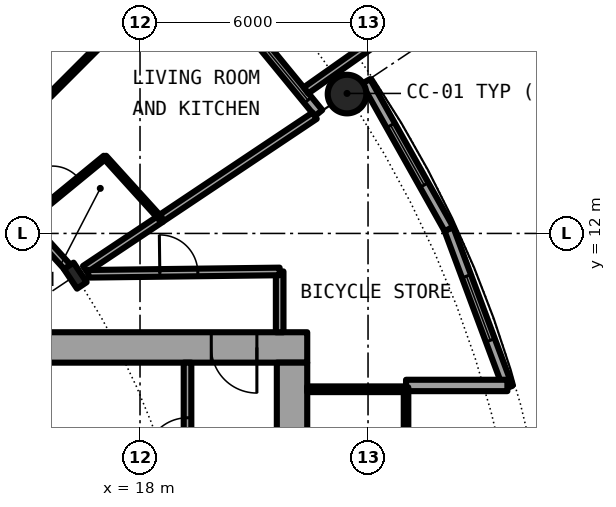
"""IFC4 building model, lengths in metres.
Left out: names, types, materials, properties, quantities, classifications, styles, units other than length and angle.
Written with IfcOpenShell. Run it as: python <this file> out.ifc"""

import sys

from ifc_helpers import new_model, si_unit, direction, frame, frame_2d, origin, origin_2d, place, context, subcontext, project, spatial, rectangle, hollow_circle, i_section, extrude, element, fill, save


model = new_model("IFC4")
c1 = context("Model", 3, precision=1e-05, world=origin(), true_north=direction((0.0, 1.0)))
c2 = subcontext(c1, "Body", "Model", "MODEL_VIEW")
j1 = project(units=[si_unit("LENGTHUNIT", "METRE"), si_unit("PLANEANGLEUNIT", "RADIAN")], contexts=[c1])
p1 = place(None, origin())
s1 = spatial("IfcSite", under=j1, at=p1, CompositionType="ELEMENT")
p2 = place(p1, origin())
s2 = spatial("IfcBuilding", under=s1, at=p2, CompositionType="ELEMENT")
p3 = place(p2, frame((0.0, 0.0, 22.8)))
s3 = spatial("IfcBuildingStorey", under=s2, at=p3, CompositionType="ELEMENT", Elevation=22.8)
p4 = place(p3, frame((23.448, 15.667, 0.0), z_axis=(0.0, 0.0, 1.0), x_axis=(1.0, 0.0, 0.0)))
e1 = element("IfcColumn", 1, at=p4, inside=s3, PredefinedType="COLUMN", context=c2, shape_type="SweptSolid", body=[
    extrude(hollow_circle(Radius=0.508, WallThickness=0.05, at=origin_2d()), origin(), (0.0, 0.0, 1.0), 3.05),
])
p5 = place(p3, frame((16.297, 10.889, 0.0), z_axis=(0.0, 0.0, 1.0), x_axis=(0.831469612303, 0.55557023302, 0.0)))
e2 = element("IfcColumn", 2, at=p5, inside=s3, PredefinedType="COLUMN", context=c2, shape_type="SweptSolid", body=[
    extrude(i_section(OverallWidth=0.305, OverallDepth=0.62, WebThickness=0.021, FlangeThickness=0.04, FilletRadius=0.027, at=origin_2d()), origin(), (0.0, 0.0, 1.0), 3.05),
])
p6 = place(p3, frame((22.699, 15.167, 0.0), z_axis=(0.0, 0.0, 1.0), x_axis=(-0.634382322723, 0.773019449054, 0.0)))
e3 = element("IfcWall", 3, at=p6, inside=s3, PredefinedType="SOLIDWALL", context=c2, shape_type="SweptSolid", body=[
    extrude(rectangle(XDim=5.352, YDim=0.25, at=frame_2d((2.676, 0.0))), origin(), (0.0, 0.0, 1.0), 2.7),
])
p7 = place(p6, frame((0.441, 0.0, 0.3)))
e4 = element("IfcOpeningElement", 4, at=p7, cuts=e3, PredefinedType="OPENING", context=c2, shape_type="SweptSolid", body=[
    extrude(rectangle(XDim=1.8, YDim=2.1, at=frame_2d((0.9, 1.05))), frame((0.0, 0.135, 0.0), z_axis=(0.0, -1.0, 0.0), x_axis=(1.0, 0.0, 0.0)), (0.0, 0.0, 1.0), 0.27),
])
p8 = place(p6, frame((3.51, 0.0, 0.0)))
e5 = element("IfcOpeningElement", 5, at=p8, cuts=e3, PredefinedType="OPENING", context=c2, shape_type="SweptSolid", body=[
    extrude(rectangle(XDim=1.0, YDim=2.2, at=frame_2d((0.5, 1.1))), frame((0.0, 0.135, 0.0), z_axis=(0.0, -1.0, 0.0), x_axis=(1.0, 0.0, 0.0)), (0.0, 0.0, 1.0), 0.27),
])
p9 = place(p3, frame((22.37, 15.765, -0.03), z_axis=(0.0, 0.0, 1.0), x_axis=(0.817256123454, 0.576274612209, 0.0)))
e6 = element("IfcWall", 6, at=p9, inside=s3, PredefinedType="SOLIDWALL", context=c2, shape_type="SweptSolid", body=[
    extrude(rectangle(XDim=2.933, YDim=0.2, at=frame_2d((1.466, 0.0))), origin(), (0.0, 0.0, 1.0), 2.73),
])
p10 = place(p3, frame((27.682, 7.945, 0.0), z_axis=(0.0, 0.0, 1.0), x_axis=(-0.349247811493, 0.937030397675, 0.0)))
e7 = element("IfcWall", 7, at=p10, inside=s3, PredefinedType="SOLIDWALL", context=c2, shape_type="SweptSolid", body=[
    extrude(rectangle(XDim=4.452, YDim=0.25, at=frame_2d((2.226, 0.0))), origin(), (0.0, 0.0, 1.0), 2.7),
])
p11 = place(p10, frame((1.327, 0.0, 0.3)))
e8 = element("IfcOpeningElement", 8, at=p11, cuts=e7, PredefinedType="OPENING", context=c2, shape_type="SweptSolid", body=[
    extrude(rectangle(XDim=1.8, YDim=2.1, at=frame_2d((0.9, 1.05))), frame((0.0, 0.135, 0.0), z_axis=(0.0, -1.0, 0.0), x_axis=(1.0, 0.0, 0.0)), (0.0, 0.0, 1.0), 0.27),
])
p12 = place(p3, frame((26.127, 12.117, 0.0), z_axis=(0.0, 0.0, 1.0), x_axis=(-0.489696356642, 0.871893042919, 0.0)))
e9 = element("IfcWall", 9, at=p12, inside=s3, PredefinedType="SOLIDWALL", context=c2, shape_type="SweptSolid", body=[
    extrude(rectangle(XDim=4.454, YDim=0.25, at=frame_2d((2.227, 0.0))), origin(), (0.0, 0.0, 1.0), 2.7),
])
p13 = place(p12, frame((1.327, 0.0, 0.3)))
e10 = element("IfcOpeningElement", 10, at=p13, cuts=e9, PredefinedType="OPENING", context=c2, shape_type="SweptSolid", body=[
    extrude(rectangle(XDim=1.8, YDim=2.1, at=frame_2d((0.9, 1.05))), frame((0.0, 0.135, 0.0), z_axis=(0.0, -1.0, 0.0), x_axis=(1.0, 0.0, 0.0)), (0.0, 0.0, 1.0), 0.27),
])
p14 = place(p3, frame((25.0, 8.0, 0.0), z_axis=(0.0, 0.0, 1.0), x_axis=(1.0, 0.0, 0.0)))
e11 = element("IfcWall", 11, at=p14, inside=s3, PredefinedType="SOLIDWALL", context=c2, shape_type="SweptSolid", body=[
    extrude(rectangle(XDim=2.667, YDim=0.3, at=frame_2d((1.333, 0.0))), origin(), (0.0, 0.0, 1.0), 2.7),
])
p15 = place(p3, frame((22.4, 9.0, 0.0), z_axis=(0.0, 0.0, 1.0), x_axis=(-1.0, 0.0, 0.0)))
e12 = element("IfcWall", 12, at=p15, inside=s3, PredefinedType="SHEAR", context=c2, shape_type="SweptSolid", body=[
    extrude(rectangle(XDim=14.2, YDim=0.8, at=frame_2d((7.1, 0.0))), origin(), (0.0, 0.0, 1.0), 3.05),
])
p16 = place(p15, frame((1.325, 0.0, 0.0)))
e13 = element("IfcOpeningElement", 13, at=p16, cuts=e12, PredefinedType="OPENING", context=c2, shape_type="SweptSolid", body=[
    extrude(rectangle(XDim=1.2, YDim=2.3, at=frame_2d((0.6, 1.15))), frame((0.0, 0.41, 0.0), z_axis=(0.0, -1.0, 0.0), x_axis=(1.0, 0.0, 0.0)), (0.0, 0.0, 1.0), 0.82),
])
p17 = place(p3, frame((22.0, 8.6, 0.0), z_axis=(0.0, 0.0, 1.0), x_axis=(0.0, -1.0, 0.0)))
e14 = element("IfcWall", 14, at=p17, inside=s3, PredefinedType="SHEAR", context=c2, shape_type="SweptSolid", body=[
    extrude(rectangle(XDim=17.2, YDim=0.8, at=frame_2d((8.6, 0.0))), origin(), (0.0, 0.0, 1.0), 3.05),
])
p18 = place(p17, frame((7.7, 0.0, 0.0)))
e15 = element("IfcOpeningElement", 15, at=p18, cuts=e14, PredefinedType="OPENING", context=c2, shape_type="SweptSolid", body=[
    extrude(rectangle(XDim=1.8, YDim=2.3, at=frame_2d((0.9, 1.15))), frame((0.0, 0.41, 0.0), z_axis=(0.0, -1.0, 0.0), x_axis=(1.0, 0.0, 0.0)), (0.0, 0.0, 1.0), 0.82),
])
p19 = place(p3, frame((19.25, 1.575, 0.0), z_axis=(0.0, 0.0, 1.0), x_axis=(0.0, 1.0, 0.0)))
e16 = element("IfcWall", 16, at=p19, inside=s3, PredefinedType="SOLIDWALL", context=c2, shape_type="SweptSolid", body=[
    extrude(rectangle(XDim=7.025, YDim=0.2, at=frame_2d((3.513, 0.0))), origin(), (0.0, 0.0, 1.0), 2.7),
])
p20 = place(p19, frame((4.475, 0.0, 0.0)))
e17 = element("IfcOpeningElement", 17, at=p20, cuts=e16, PredefinedType="OPENING", context=c2, shape_type="SweptSolid", body=[
    extrude(rectangle(XDim=1.1, YDim=2.3, at=frame_2d((0.55, 1.15))), frame((0.0, 0.11, 0.0), z_axis=(0.0, -1.0, 0.0), x_axis=(1.0, 0.0, 0.0)), (0.0, 0.0, 1.0), 0.22),
])
p21 = place(p3, frame((22.4, 7.9, 0.0), z_axis=(0.0, 0.0, 1.0), x_axis=(1.0, 0.0, 0.0)))
e18 = element("IfcWall", 18, at=p21, inside=s3, PredefinedType="PARTITIONING", context=c2, shape_type="SweptSolid", body=[
    extrude(rectangle(XDim=2.54, YDim=0.15, at=frame_2d((1.27, 0.0))), origin(), (0.0, 0.0, 1.0), 2.7),
])
p22 = place(p3, frame((25.0, -7.95, 0.0), z_axis=(0.0, 0.0, 1.0), x_axis=(0.0, 1.0, 0.0)))
e19 = element("IfcWall", 19, at=p22, inside=s3, PredefinedType="PARTITIONING", context=c2, shape_type="SweptSolid", body=[
    extrude(rectangle(XDim=15.9, YDim=0.12, at=frame_2d((7.95, 0.0))), origin(), (0.0, 0.0, 1.0), 2.7),
])
p23 = place(p22, frame((0.95, 0.0, 0.1)))
e20 = element("IfcOpeningElement", 20, at=p23, cuts=e19, PredefinedType="OPENING", context=c2, shape_type="SweptSolid", body=[
    extrude(rectangle(XDim=14.0, YDim=2.35, at=frame_2d((7.0, 1.175))), frame((0.0, 0.07, 0.0), z_axis=(0.0, -1.0, 0.0), x_axis=(1.0, 0.0, 0.0)), (0.0, 0.0, 1.0), 0.14),
])
p24 = place(p3, frame((21.675, 9.4, 0.0), z_axis=(0.0, 0.0, 1.0), x_axis=(0.0, 1.0, 0.0)))
e21 = element("IfcWall", 21, at=p24, inside=s3, PredefinedType="PARTITIONING", context=c2, shape_type="SweptSolid", body=[
    extrude(rectangle(XDim=1.6, YDim=0.2, at=frame_2d((0.8, 0.0))), origin(), (0.0, 0.0, 1.0), 2.7),
])
p25 = place(p3, frame((12.432, 15.152, 0.0), z_axis=(0.0, 0.0, 1.0), x_axis=(0.634353152115, 0.77304338714, 0.0)))
e22 = element("IfcWall", 22, at=p25, inside=s3, PredefinedType="PARTITIONING", context=c2, shape_type="SweptSolid", body=[
    extrude(rectangle(XDim=7.576, YDim=0.2, at=frame_2d((3.788, 0.0))), origin(), (0.0, 0.0, 1.0), 2.7),
])
p26 = place(p3, frame((15.009, 12.31, 0.0), z_axis=(0.0, 0.0, 1.0), x_axis=(0.77319617123, 0.634166918717, 0.0)))
e23 = element("IfcWall", 23, at=p26, inside=s3, PredefinedType="PARTITIONING", context=c2, shape_type="SweptSolid", body=[
    extrude(rectangle(XDim=2.675, YDim=0.1, at=frame_2d((1.337, 0.0))), origin(), (0.0, 0.0, 1.0), 2.7),
])
p27 = place(p26, frame((0.887, 0.0, 0.0)))
e24 = element("IfcOpeningElement", 24, at=p27, cuts=e23, PredefinedType="OPENING", context=c2, shape_type="SweptSolid", body=[
    extrude(rectangle(XDim=0.9, YDim=2.3, at=frame_2d((0.45, 1.15))), frame((0.0, 0.06, 0.0), z_axis=(0.0, -1.0, 0.0), x_axis=(1.0, 0.0, 0.0)), (0.0, 0.0, 1.0), 0.12),
])
p28 = place(p3, frame((15.612, 15.622, 0.0), z_axis=(0.0, 0.0, 1.0), x_axis=(0.706914880313, 0.707298629994, 0.0)))
e25 = element("IfcWall", 25, at=p28, inside=s3, PredefinedType="PARTITIONING", context=c2, shape_type="SweptSolid", body=[
    extrude(rectangle(XDim=5.09, YDim=0.1, at=frame_2d((2.545, 0.0))), origin(), (0.0, 0.0, 1.0), 2.7),
])
p29 = place(p28, frame((2.095, 0.0, 0.0)))
e26 = element("IfcOpeningElement", 26, at=p29, cuts=e25, PredefinedType="OPENING", context=c2, shape_type="SweptSolid", body=[
    extrude(rectangle(XDim=0.9, YDim=2.3, at=frame_2d((0.45, 1.15))), frame((0.0, 0.06, 0.0), z_axis=(0.0, -1.0, 0.0), x_axis=(1.0, 0.0, 0.0)), (0.0, 0.0, 1.0), 0.12),
])
p30 = place(p3, frame((18.542, 12.389, 0.0), z_axis=(0.0, 0.0, 1.0), x_axis=(0.831387096605, 0.55569370664, 0.0)))
e27 = element("IfcWall", 27, at=p30, inside=s3, PredefinedType="PARTITIONING", context=c2, shape_type="SweptSolid", body=[
    extrude(rectangle(XDim=4.875, YDim=0.2, at=frame_2d((2.438, 0.0))), origin(), (0.0, 0.0, 1.0), 2.7),
])
p31 = place(p3, frame((16.555, 11.061, 0.0), z_axis=(0.0, 0.0, 1.0), x_axis=(0.832066006555, 0.554676627176, 0.0)))
e28 = element("IfcWall", 28, at=p31, inside=s3, PredefinedType="PARTITIONING", context=c2, shape_type="SweptSolid", body=[
    extrude(rectangle(XDim=2.39, YDim=0.2, at=frame_2d((1.195, 0.0))), origin(), (0.0, 0.0, 1.0), 2.7),
])
p32 = place(p3, frame((16.637, 10.938, 0.0), z_axis=(0.0, 0.0, 1.0), x_axis=(0.99992425795, 0.012307654658, 0.0)))
e29 = element("IfcWall", 29, at=p32, inside=s3, PredefinedType="PARTITIONING", context=c2, shape_type="SweptSolid", body=[
    extrude(rectangle(XDim=5.039, YDim=0.2, at=frame_2d((2.519, 0.0))), origin(), (0.0, 0.0, 1.0), 2.7),
])
p33 = place(p32, frame((1.884, 0.0, 0.0)))
e30 = element("IfcOpeningElement", 30, at=p33, cuts=e29, PredefinedType="OPENING", context=c2, shape_type="SweptSolid", body=[
    extrude(rectangle(XDim=1.0, YDim=2.3, at=frame_2d((0.5, 1.15))), frame((0.0, 0.11, 0.0), z_axis=(0.0, -1.0, 0.0), x_axis=(1.0, 0.0, 0.0)), (0.0, 0.0, 1.0), 0.22),
])
p34 = place(p3, frame((12.434, 15.151, 0.0), z_axis=(0.0, 0.0, 1.0), x_axis=(0.671514934772, -0.740991020444, 0.0)))
e31 = element("IfcWall", 31, at=p34, inside=s3, PredefinedType="PARTITIONING", context=c2, shape_type="SweptSolid", body=[
    extrude(rectangle(XDim=5.598, YDim=0.2, at=frame_2d((2.799, 0.0))), origin(), (0.0, 0.0, 1.0), 2.38),
])
p35 = place(p34, frame((1.417, 0.0, 0.0)))
e32 = element("IfcOpeningElement", 32, at=p35, cuts=e31, PredefinedType="OPENING", context=c2, shape_type="SweptSolid", body=[
    extrude(rectangle(XDim=1.0, YDim=2.3, at=frame_2d((0.5, 1.15))), frame((0.0, 0.11, 0.0), z_axis=(0.0, -1.0, 0.0), x_axis=(1.0, 0.0, 0.0)), (0.0, 0.0, 1.0), 0.22),
])
p36 = place(p3, frame((17.072, 14.011, 0.0), z_axis=(0.0, 0.0, 1.0), x_axis=(0.67169789574, -0.740825172937, 0.0)))
e33 = element("IfcWall", 33, at=p36, inside=s3, PredefinedType="PARTITIONING", context=c2, shape_type="SweptSolid", body=[
    extrude(rectangle(XDim=2.183, YDim=0.1, at=frame_2d((1.091, 0.0))), origin(), (0.0, 0.0, 1.0), 2.7),
])
p37 = place(p7, origin())
e34 = element("IfcWindow", 34, at=p37, inside=s3, PartitioningType="SINGLE_PANEL", PredefinedType="WINDOW", context=c2, shape_type="SweptSolid", body=[
    extrude(rectangle(XDim=1.8, YDim=2.1, at=frame_2d((0.9, 1.05))), frame((0.0, 0.03, 0.0), z_axis=(0.0, -1.0, 0.0), x_axis=(1.0, 0.0, 0.0)), (0.0, 0.0, 1.0), 0.06),
])
fill(e4, e34)
p38 = place(p11, origin())
e35 = element("IfcWindow", 35, at=p38, inside=s3, PartitioningType="SINGLE_PANEL", PredefinedType="WINDOW", context=c2, shape_type="SweptSolid", body=[
    extrude(rectangle(XDim=1.8, YDim=2.1, at=frame_2d((0.9, 1.05))), frame((0.0, 0.03, 0.0), z_axis=(0.0, -1.0, 0.0), x_axis=(1.0, 0.0, 0.0)), (0.0, 0.0, 1.0), 0.06),
])
fill(e8, e35)
p39 = place(p13, origin())
e36 = element("IfcWindow", 36, at=p39, inside=s3, PartitioningType="SINGLE_PANEL", PredefinedType="WINDOW", context=c2, shape_type="SweptSolid", body=[
    extrude(rectangle(XDim=1.8, YDim=2.1, at=frame_2d((0.9, 1.05))), frame((0.0, 0.03, 0.0), z_axis=(0.0, -1.0, 0.0), x_axis=(1.0, 0.0, 0.0)), (0.0, 0.0, 1.0), 0.06),
])
fill(e10, e36)
p40 = place(p20, origin())
e37 = element("IfcDoor", 37, at=p40, inside=s3, OperationType="SINGLE_SWING_LEFT", PredefinedType="DOOR", context=c2, shape_type="SweptSolid", body=[
    extrude(rectangle(XDim=1.1, YDim=2.3, at=frame_2d((0.55, 1.15))), frame((0.0, 0.025, 0.0), z_axis=(0.0, -1.0, 0.0), x_axis=(1.0, 0.0, 0.0)), (0.0, 0.0, 1.0), 0.05),
])
fill(e17, e37)
p41 = place(p16, origin())
e38 = element("IfcDoor", 38, at=p41, inside=s3, OperationType="SINGLE_SWING_RIGHT", PredefinedType="DOOR", context=c2, shape_type="SweptSolid", body=[
    extrude(rectangle(XDim=1.2, YDim=2.3, at=frame_2d((0.6, 1.15))), frame((0.0, 0.025, 0.0), z_axis=(0.0, -1.0, 0.0), x_axis=(1.0, 0.0, 0.0)), (0.0, 0.0, 1.0), 0.05),
])
fill(e13, e38)
p42 = place(p23, origin())
e39 = element("IfcWindow", 39, at=p42, inside=s3, PartitioningType="SINGLE_PANEL", PredefinedType="WINDOW", context=c2, shape_type="SweptSolid", body=[
    extrude(rectangle(XDim=14.0, YDim=2.35, at=frame_2d((7.0, 1.175))), frame((0.0, 0.03, 0.0), z_axis=(0.0, -1.0, 0.0), x_axis=(1.0, 0.0, 0.0)), (0.0, 0.0, 1.0), 0.06),
])
fill(e20, e39)
p43 = place(p27, origin())
e40 = element("IfcDoor", 40, at=p43, inside=s3, OperationType="SINGLE_SWING_RIGHT", PredefinedType="DOOR", context=c2, shape_type="SweptSolid", body=[
    extrude(rectangle(XDim=0.9, YDim=2.3, at=frame_2d((0.45, 1.15))), frame((0.0, 0.025, 0.0), z_axis=(0.0, -1.0, 0.0), x_axis=(1.0, 0.0, 0.0)), (0.0, 0.0, 1.0), 0.05),
])
fill(e24, e40)
p44 = place(p33, origin())
e41 = element("IfcDoor", 41, at=p44, inside=s3, OperationType="SINGLE_SWING_LEFT", PredefinedType="DOOR", context=c2, shape_type="SweptSolid", body=[
    extrude(rectangle(XDim=1.0, YDim=2.3, at=frame_2d((0.5, 1.15))), frame((0.0, 0.025, 0.0), z_axis=(0.0, -1.0, 0.0), x_axis=(1.0, 0.0, 0.0)), (0.0, 0.0, 1.0), 0.05),
])
fill(e30, e41)
save(model, sys.argv[1])
